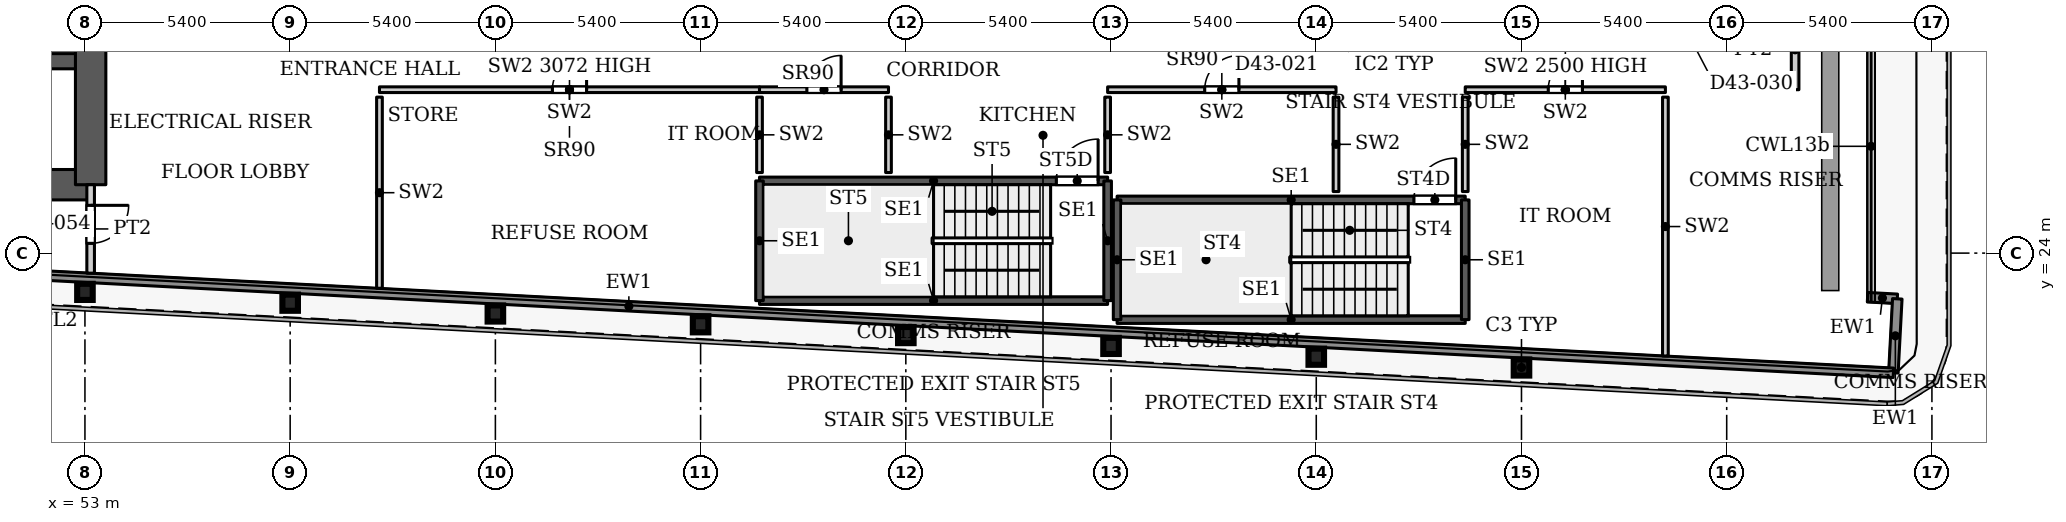
"""IFC4 building model, lengths in metres.
Left out: names, types, materials, properties, quantities, classifications, styles, units other than length and angle.
Written with IfcOpenShell. Run it as: python <this file> out.ifc"""

import sys

from ifc_helpers import new_model, si_unit, direction, frame, frame_2d, origin, origin_2d, place, context, subcontext, project, spatial, rectangle, i_section, extrude, source, transform, mapped, element, fill, save


model = new_model("IFC4")
c1 = context("Model", 3, precision=1e-05, world=origin(), true_north=direction((0.0, 1.0)))
c2 = subcontext(c1, "Body", "Model", "MODEL_VIEW")
j1 = project(units=[si_unit("LENGTHUNIT", "METRE"), si_unit("PLANEANGLEUNIT", "RADIAN")], contexts=[c1])
p1 = place(None, origin())
s1 = spatial("IfcSite", under=j1, at=p1, CompositionType="ELEMENT")
p2 = place(p1, origin())
s2 = spatial("IfcBuilding", under=s1, at=p2, CompositionType="ELEMENT")
p3 = place(p2, frame((0.0, 0.0, 183.8)))
s3 = spatial("IfcBuildingStorey", under=s2, at=p3, CompositionType="ELEMENT", Elevation=183.8)
for number, where, z_axis, x_axis in (
    (1, (90.8, 20.99, 0.0), (0.0, 0.0, 1.0), (1.0, 0.0, 0.0)),
    (2, (85.4, 21.274, 0.0), (0.0, 0.0, 1.0), (1.0, 0.0, 0.0)),
    (3, (80.0, 21.558, 0.0), (0.0, 0.0, 1.0), (1.0, 0.0, 0.0)),
    (4, (74.6, 21.843, 0.0), (0.0, 0.0, 1.0), (1.0, 0.0, 0.0)),
    (5, (69.2, 22.127, 0.0), (0.0, 0.0, 1.0), (1.0, 0.0, 0.0)),
    (6, (63.8, 22.411, 0.0), (0.0, 0.0, 1.0), (1.0, 0.0, 0.0)),
    (7, (58.4, 22.695, 0.0), (0.0, 0.0, 1.0), (1.0, 0.0, 0.0)),
    (8, (53.0, 22.98, 0.0), (0.0, 0.0, 1.0), (1.0, 0.0, 0.0)),
):
    element("IfcColumn", number, at=place(p3, frame(where, z_axis=z_axis, x_axis=x_axis)), inside=s3, PredefinedType="COLUMN", context=c2, shape_type="SweptSolid", body=[
        extrude(i_section(OverallWidth=0.409, OverallDepth=0.425, WebThickness=0.033, FlangeThickness=0.052, FilletRadius=0.013, at=origin_2d()), origin(), (0.0, 0.0, 1.0), 3.9),
    ])
p4 = place(p3, frame((34.75, 25.8, 0.0), z_axis=(0.0, 0.0, 1.0), x_axis=(1.0, 0.0, 0.0)))
e9 = element("IfcWall", 9, at=p4, inside=s3, PredefinedType="SHEAR", context=c2, shape_type="SweptSolid", body=[
    extrude(rectangle(XDim=18.4, YDim=0.8, at=frame_2d((9.2, 0.0))), origin(), (0.0, 0.0, 1.0), 3.9),
])
p5 = place(p3, frame((34.75, 29.05, 0.0), z_axis=(0.0, 0.0, 1.0), x_axis=(1.0, 0.0, 0.0)))
e10 = element("IfcWall", 10, at=p5, inside=s3, PredefinedType="SHEAR", context=c2, shape_type="SweptSolid", body=[
    extrude(rectangle(XDim=18.4, YDim=0.4, at=frame_2d((9.2, 0.0))), origin(), (0.0, 0.0, 1.0), 3.9),
])
p6 = place(p5, frame((0.875, 0.0, 0.0)))
e11 = element("IfcOpeningElement", 11, at=p6, cuts=e10, PredefinedType="OPENING", context=c2, shape_type="SweptSolid", body=[
    extrude(rectangle(XDim=1.1, YDim=2.2, at=frame_2d((0.55, 1.1))), frame((0.0, 0.21, 0.0), z_axis=(0.0, -1.0, 0.0), x_axis=(1.0, 0.0, 0.0)), (0.0, 0.0, 1.0), 0.42),
])
p7 = place(p5, frame((3.725, 0.0, 0.0)))
e12 = element("IfcOpeningElement", 12, at=p7, cuts=e10, PredefinedType="OPENING", context=c2, shape_type="SweptSolid", body=[
    extrude(rectangle(XDim=1.1, YDim=2.2, at=frame_2d((0.55, 1.1))), frame((0.0, 0.21, 0.0), z_axis=(0.0, -1.0, 0.0), x_axis=(1.0, 0.0, 0.0)), (0.0, 0.0, 1.0), 0.42),
])
p8 = place(p5, frame((6.575, 0.0, 0.0)))
e13 = element("IfcOpeningElement", 13, at=p8, cuts=e10, PredefinedType="OPENING", context=c2, shape_type="SweptSolid", body=[
    extrude(rectangle(XDim=1.1, YDim=2.2, at=frame_2d((0.55, 1.1))), frame((0.0, 0.21, 0.0), z_axis=(0.0, -1.0, 0.0), x_axis=(1.0, 0.0, 0.0)), (0.0, 0.0, 1.0), 0.42),
])
p9 = place(p5, frame((9.425, 0.0, 0.0)))
e14 = element("IfcOpeningElement", 14, at=p9, cuts=e10, PredefinedType="OPENING", context=c2, shape_type="SweptSolid", body=[
    extrude(rectangle(XDim=1.1, YDim=2.2, at=frame_2d((0.55, 1.1))), frame((0.0, 0.21, 0.0), z_axis=(0.0, -1.0, 0.0), x_axis=(1.0, 0.0, 0.0)), (0.0, 0.0, 1.0), 0.42),
])
p10 = place(p5, frame((12.275, 0.0, 0.0)))
e15 = element("IfcOpeningElement", 15, at=p10, cuts=e10, PredefinedType="OPENING", context=c2, shape_type="SweptSolid", body=[
    extrude(rectangle(XDim=1.1, YDim=2.2, at=frame_2d((0.55, 1.1))), frame((0.0, 0.21, 0.0), z_axis=(0.0, -1.0, 0.0), x_axis=(1.0, 0.0, 0.0)), (0.0, 0.0, 1.0), 0.42),
])
p11 = place(p5, frame((15.125, 0.0, 0.0)))
e16 = element("IfcOpeningElement", 16, at=p11, cuts=e10, PredefinedType="OPENING", context=c2, shape_type="SweptSolid", body=[
    extrude(rectangle(XDim=1.1, YDim=2.2, at=frame_2d((0.55, 1.1))), frame((0.0, 0.21, 0.0), z_axis=(0.0, -1.0, 0.0), x_axis=(1.0, 0.0, 0.0)), (0.0, 0.0, 1.0), 0.42),
])
p12 = place(p3, frame((53.15, 25.8, 0.0), z_axis=(0.0, 0.0, 1.0), x_axis=(0.0, 1.0, 0.0)))
e17 = element("IfcWall", 17, at=p12, inside=s3, PredefinedType="SHEAR", context=c2, shape_type="SweptSolid", body=[
    extrude(rectangle(XDim=10.4, YDim=0.8, at=frame_2d((5.2, 0.0))), origin(), (0.0, 0.0, 1.0), 3.9),
])
p13 = place(p3, frame((99.907, 22.839, 0.0), z_axis=(0.0, 0.0, 1.0), x_axis=(0.998561284263, -0.053622398031, 0.0)))
e18 = element("IfcWall", 18, at=p13, inside=s3, PredefinedType="SOLIDWALL", context=c2, shape_type="SweptSolid", body=[
    extrude(rectangle(XDim=0.783, YDim=0.25, at=frame_2d((0.392, 0.0))), origin(), (0.0, 0.0, 1.0), 3.75),
])
p14 = place(p3, frame((100.689, 22.797, 0.0), z_axis=(0.0, 0.0, 1.0), x_axis=(-0.052841433274, -0.998602915542, 0.0)))
e19 = element("IfcWall", 19, at=p14, inside=s3, PredefinedType="SOLIDWALL", context=c2, shape_type="SweptSolid", body=[
    extrude(rectangle(XDim=1.95, YDim=0.25, at=frame_2d((0.975, 0.0))), origin(), (0.0, 0.0, 1.0), 3.75),
])
p15 = place(p3, frame((100.586, 20.85, 0.0), z_axis=(0.0, 0.0, 1.0), x_axis=(-0.99861746497, 0.052565755559, 0.0)))
e20 = element("IfcWall", 20, at=p15, inside=s3, PredefinedType="SOLIDWALL", context=c2, shape_type="SweptSolid", body=[
    extrude(rectangle(XDim=66.639, YDim=0.25, at=frame_2d((33.319, 0.0))), origin(), (0.0, 0.0, 1.0), 3.75),
])
p16 = place(p3, frame((80.16, 22.25, 0.0), z_axis=(0.0, 0.0, 1.0), x_axis=(1.0, 0.0, 0.0)))
e21 = element("IfcWall", 21, at=p16, inside=s3, PredefinedType="SHEAR", context=c2, shape_type="SweptSolid", body=[
    extrude(rectangle(XDim=9.16, YDim=0.2, at=frame_2d((4.58, 0.0))), origin(), (0.0, 0.0, 1.0), 3.9),
])
p17 = place(p3, frame((80.16, 25.4, 0.0), z_axis=(0.0, 0.0, 1.0), x_axis=(1.0, 0.0, 0.0)))
e22 = element("IfcWall", 22, at=p17, inside=s3, PredefinedType="SHEAR", context=c2, shape_type="SweptSolid", body=[
    extrude(rectangle(XDim=9.16, YDim=0.2, at=frame_2d((4.58, 0.0))), origin(), (0.0, 0.0, 1.0), 3.9),
])
p18 = place(p17, frame((7.81, 0.0, 0.0)))
e23 = element("IfcOpeningElement", 23, at=p18, cuts=e22, PredefinedType="OPENING", context=c2, shape_type="SweptSolid", body=[
    extrude(rectangle(XDim=1.1, YDim=2.2, at=frame_2d((0.55, 1.1))), frame((0.0, 0.11, 0.0), z_axis=(0.0, -1.0, 0.0), x_axis=(1.0, 0.0, 0.0)), (0.0, 0.0, 1.0), 0.22),
])
for number, where, z_axis, x_axis in (
    (24, (80.16, 22.25, 0.0), (0.0, 0.0, 1.0), (0.0, 1.0, 0.0)),
    (25, (89.32, 22.25, 0.0), (0.0, 0.0, 1.0), (0.0, 1.0, 0.0)),
):
    element("IfcWall", number, at=place(p3, frame(where, z_axis=z_axis, x_axis=x_axis)), inside=s3, PredefinedType="SHEAR", context=c2, shape_type="SweptSolid", body=[
        extrude(rectangle(XDim=3.15, YDim=0.2, at=frame_2d((1.575, 0.0))), origin(), (0.0, 0.0, 1.0), 3.9),
    ])
p19 = place(p3, frame((70.75, 22.75, 0.0), z_axis=(0.0, 0.0, 1.0), x_axis=(1.0, 0.0, 0.0)))
e26 = element("IfcWall", 26, at=p19, inside=s3, PredefinedType="SHEAR", context=c2, shape_type="SweptSolid", body=[
    extrude(rectangle(XDim=9.16, YDim=0.2, at=frame_2d((4.58, 0.0))), origin(), (0.0, 0.0, 1.0), 3.9),
])
p20 = place(p3, frame((70.75, 25.9, 0.0), z_axis=(0.0, 0.0, 1.0), x_axis=(1.0, 0.0, 0.0)))
e27 = element("IfcWall", 27, at=p20, inside=s3, PredefinedType="SHEAR", context=c2, shape_type="SweptSolid", body=[
    extrude(rectangle(XDim=9.16, YDim=0.2, at=frame_2d((4.58, 0.0))), origin(), (0.0, 0.0, 1.0), 3.9),
])
p21 = place(p20, frame((7.81, 0.0, 0.0)))
e28 = element("IfcOpeningElement", 28, at=p21, cuts=e27, PredefinedType="OPENING", context=c2, shape_type="SweptSolid", body=[
    extrude(rectangle(XDim=1.1, YDim=2.2, at=frame_2d((0.55, 1.1))), frame((0.0, 0.11, 0.0), z_axis=(0.0, -1.0, 0.0), x_axis=(1.0, 0.0, 0.0)), (0.0, 0.0, 1.0), 0.22),
])
for number, where, z_axis, x_axis in (
    (29, (70.75, 22.75, 0.0), (0.0, 0.0, 1.0), (0.0, 1.0, 0.0)),
    (30, (79.91, 22.75, 0.0), (0.0, 0.0, 1.0), (0.0, 1.0, 0.0)),
):
    element("IfcWall", number, at=place(p3, frame(where, z_axis=z_axis, x_axis=x_axis)), inside=s3, PredefinedType="SHEAR", context=c2, shape_type="SweptSolid", body=[
        extrude(rectangle(XDim=3.15, YDim=0.2, at=frame_2d((1.575, 0.0))), origin(), (0.0, 0.0, 1.0), 3.9),
    ])
p22 = place(p3, frame((60.75, 28.3, 0.0), z_axis=(0.0, 0.0, 1.0), x_axis=(1.0, 0.0, 0.0)))
e31 = element("IfcWall", 31, at=p22, inside=s3, PredefinedType="PARTITIONING", context=c2, shape_type="SweptSolid", body=[
    extrude(rectangle(XDim=10.0, YDim=0.15, at=frame_2d((5.0, 0.0))), origin(), (0.0, 0.0, 1.0), 3.072),
])
p23 = place(p22, frame((4.55, 0.0, 0.0)))
e32 = element("IfcOpeningElement", 32, at=p23, cuts=e31, PredefinedType="OPENING", context=c2, shape_type="SweptSolid", body=[
    extrude(rectangle(XDim=0.9, YDim=2.2, at=frame_2d((0.45, 1.1))), frame((0.0, 0.085, 0.0), z_axis=(0.0, -1.0, 0.0), x_axis=(1.0, 0.0, 0.0)), (0.0, 0.0, 1.0), 0.17),
])
p24 = place(p3, frame((60.75, 23.075, 0.0), z_axis=(0.0, 0.0, 1.0), x_axis=(0.0, 1.0, 0.0)))
e33 = element("IfcWall", 33, at=p24, inside=s3, PredefinedType="PARTITIONING", context=c2, shape_type="SweptSolid", body=[
    extrude(rectangle(XDim=5.03, YDim=0.15, at=frame_2d((2.515, 0.0))), origin(), (0.0, 0.0, 1.0), 3.9),
])
p25 = place(p3, frame((70.75, 26.12, 0.0), z_axis=(0.0, 0.0, 1.0), x_axis=(0.0, 1.0, 0.0)))
e34 = element("IfcWall", 34, at=p25, inside=s3, PredefinedType="PARTITIONING", context=c2, shape_type="SweptSolid", body=[
    extrude(rectangle(XDim=1.985, YDim=0.15, at=frame_2d((0.992, 0.0))), origin(), (0.0, 0.0, 1.0), 3.9),
])
p26 = place(p3, frame((70.75, 28.3, 0.0), z_axis=(0.0, 0.0, 1.0), x_axis=(1.0, 0.0, 0.0)))
e35 = element("IfcWall", 35, at=p26, inside=s3, PredefinedType="PARTITIONING", context=c2, shape_type="SweptSolid", body=[
    extrude(rectangle(XDim=3.394, YDim=0.15, at=frame_2d((1.697, 0.0))), origin(), (0.0, 0.0, 1.0), 3.9),
])
p27 = place(p26, frame((1.247, 0.0, 0.0)))
e36 = element("IfcOpeningElement", 36, at=p27, cuts=e35, PredefinedType="OPENING", context=c2, shape_type="SweptSolid", body=[
    extrude(rectangle(XDim=0.9, YDim=2.2, at=frame_2d((0.45, 1.1))), frame((0.0, 0.085, 0.0), z_axis=(0.0, -1.0, 0.0), x_axis=(1.0, 0.0, 0.0)), (0.0, 0.0, 1.0), 0.17),
])
p28 = place(p3, frame((74.144, 26.12, 0.0), z_axis=(0.0, 0.0, 1.0), x_axis=(0.0, 1.0, 0.0)))
e37 = element("IfcWall", 37, at=p28, inside=s3, PredefinedType="PARTITIONING", context=c2, shape_type="SweptSolid", body=[
    extrude(rectangle(XDim=1.985, YDim=0.15, at=frame_2d((0.992, 0.0))), origin(), (0.0, 0.0, 1.0), 3.9),
])
p29 = place(p3, frame((79.91, 28.3, 0.0), z_axis=(0.0, 0.0, 1.0), x_axis=(1.0, 0.0, 0.0)))
e38 = element("IfcWall", 38, at=p29, inside=s3, PredefinedType="PARTITIONING", context=c2, shape_type="SweptSolid", body=[
    extrude(rectangle(XDim=6.01, YDim=0.15, at=frame_2d((3.005, 0.0))), origin(), (0.0, 0.0, 1.0), 3.9),
])
p30 = place(p29, frame((2.555, 0.0, 0.0)))
e39 = element("IfcOpeningElement", 39, at=p30, cuts=e38, PredefinedType="OPENING", context=c2, shape_type="SweptSolid", body=[
    extrude(rectangle(XDim=0.9, YDim=2.2, at=frame_2d((0.45, 1.1))), frame((0.0, 0.085, 0.0), z_axis=(0.0, -1.0, 0.0), x_axis=(1.0, 0.0, 0.0)), (0.0, 0.0, 1.0), 0.17),
])
p31 = place(p3, frame((79.91, 26.12, 0.0), z_axis=(0.0, 0.0, 1.0), x_axis=(0.0, 1.0, 0.0)))
e40 = element("IfcWall", 40, at=p31, inside=s3, PredefinedType="PARTITIONING", context=c2, shape_type="SweptSolid", body=[
    extrude(rectangle(XDim=1.985, YDim=0.15, at=frame_2d((0.992, 0.0))), origin(), (0.0, 0.0, 1.0), 3.9),
])
p32 = place(p3, frame((85.92, 25.62, 0.0), z_axis=(0.0, 0.0, 1.0), x_axis=(0.0, 1.0, 0.0)))
e41 = element("IfcWall", 41, at=p32, inside=s3, PredefinedType="PARTITIONING", context=c2, shape_type="SweptSolid", body=[
    extrude(rectangle(XDim=2.485, YDim=0.15, at=frame_2d((1.242, 0.0))), origin(), (0.0, 0.0, 1.0), 3.9),
])
p33 = place(p3, frame((89.32, 28.3, 0.0), z_axis=(0.0, 0.0, 1.0), x_axis=(1.0, 0.0, 0.0)))
e42 = element("IfcWall", 42, at=p33, inside=s3, PredefinedType="PARTITIONING", context=c2, shape_type="SweptSolid", body=[
    extrude(rectangle(XDim=5.267, YDim=0.15, at=frame_2d((2.633, 0.0))), origin(), (0.0, 0.0, 1.0), 2.5),
])
p34 = place(p33, frame((2.184, 0.0, 0.0)))
e43 = element("IfcOpeningElement", 43, at=p34, cuts=e42, PredefinedType="OPENING", context=c2, shape_type="SweptSolid", body=[
    extrude(rectangle(XDim=0.9, YDim=2.2, at=frame_2d((0.45, 1.1))), frame((0.0, 0.085, 0.0), z_axis=(0.0, -1.0, 0.0), x_axis=(1.0, 0.0, 0.0)), (0.0, 0.0, 1.0), 0.17),
])
p35 = place(p3, frame((89.32, 25.62, 0.0), z_axis=(0.0, 0.0, 1.0), x_axis=(0.0, 1.0, 0.0)))
e44 = element("IfcWall", 44, at=p35, inside=s3, PredefinedType="PARTITIONING", context=c2, shape_type="SweptSolid", body=[
    extrude(rectangle(XDim=2.485, YDim=0.15, at=frame_2d((1.242, 0.0))), origin(), (0.0, 0.0, 1.0), 3.9),
])
p36 = place(p3, frame((94.587, 21.293, 0.0), z_axis=(0.0, 0.0, 1.0), x_axis=(0.0, 1.0, 0.0)))
e45 = element("IfcWall", 45, at=p36, inside=s3, PredefinedType="PARTITIONING", context=c2, shape_type="SweptSolid", body=[
    extrude(rectangle(XDim=6.812, YDim=0.15, at=frame_2d((3.406, 0.0))), origin(), (0.0, 0.0, 1.0), 3.9),
])
p37 = place(p3, frame((53.15, 23.472, 0.0), z_axis=(0.0, 0.0, 1.0), x_axis=(0.0, 1.0, 0.0)))
e46 = element("IfcWall", 46, at=p37, inside=s3, PredefinedType="PARTITIONING", context=c2, shape_type="SweptSolid", body=[
    extrude(rectangle(XDim=2.328, YDim=0.2, at=frame_2d((1.164, 0.0))), origin(), (0.0, 0.0, 1.0), 3.6),
])
p38 = place(p37, frame((0.785, 0.0, 0.0)))
e47 = element("IfcOpeningElement", 47, at=p38, cuts=e46, PredefinedType="OPENING", context=c2, shape_type="SweptSolid", body=[
    extrude(rectangle(XDim=1.0, YDim=2.1, at=frame_2d((0.5, 1.05))), frame((0.0, 0.11, 0.0), z_axis=(0.0, -1.0, 0.0), x_axis=(1.0, 0.0, 0.0)), (0.0, 0.0, 1.0), 0.22),
])
p39 = place(p3, frame((98.0, 28.3, 0.0), z_axis=(0.0, 0.0, 1.0), x_axis=(0.0, 1.0, 0.0)))
e48 = element("IfcWall", 48, at=p39, inside=s3, PredefinedType="PARTITIONING", context=c2, shape_type="SweptSolid", body=[
    extrude(rectangle(XDim=2.1, YDim=0.2, at=frame_2d((1.05, 0.0))), origin(), (0.0, 0.0, 1.0), 3.6),
])
m1 = source(origin(), c2, "Body", "SweptSolid", [
    extrude(rectangle(XDim=0.9, YDim=2.2, at=frame_2d((0.45, 1.1))), frame((0.0, 0.025, 0.0), z_axis=(0.0, -1.0, 0.0), x_axis=(1.0, 0.0, 0.0)), (0.0, 0.0, 1.0), 0.05),
])
p40 = place(p23, origin())
e49 = element("IfcDoor", 49, at=p40, inside=s3, OperationType="SINGLE_SWING_LEFT", PredefinedType="DOOR", context=c2, shape_type="MappedRepresentation", body=[
    mapped(m1, transform((0.0, 0.0, 0.0), x_axis=(1.0, 0.0, 0.0), y_axis=(0.0, 1.0, 0.0), z_axis=(0.0, 0.0, 1.0), scale=1.0)),
])
fill(e32, e49)
p41 = place(p27, origin())
e50 = element("IfcDoor", 50, at=p41, inside=s3, OperationType="SINGLE_SWING_LEFT", PredefinedType="DOOR", context=c2, shape_type="MappedRepresentation", body=[
    mapped(m1, transform((0.0, 0.0, 0.0), x_axis=(1.0, 0.0, 0.0), y_axis=(0.0, 1.0, 0.0), z_axis=(0.0, 0.0, 1.0), scale=1.0)),
])
fill(e36, e50)
p42 = place(p30, origin())
e51 = element("IfcDoor", 51, at=p42, inside=s3, OperationType="SINGLE_SWING_LEFT", PredefinedType="DOOR", context=c2, shape_type="MappedRepresentation", body=[
    mapped(m1, transform((0.0, 0.0, 0.0), x_axis=(1.0, 0.0, 0.0), y_axis=(0.0, 1.0, 0.0), z_axis=(0.0, 0.0, 1.0), scale=1.0)),
])
fill(e39, e51)
p43 = place(p34, origin())
e52 = element("IfcDoor", 52, at=p43, inside=s3, OperationType="SINGLE_SWING_LEFT", PredefinedType="DOOR", context=c2, shape_type="MappedRepresentation", body=[
    mapped(m1, transform((0.0, 0.0, 0.0), x_axis=(1.0, 0.0, 0.0), y_axis=(0.0, 1.0, 0.0), z_axis=(0.0, 0.0, 1.0), scale=1.0)),
])
fill(e43, e52)
m2 = source(origin(), c2, "Body", "SweptSolid", [
    extrude(rectangle(XDim=1.1, YDim=2.2, at=frame_2d((0.55, 1.1))), frame((0.0, 0.025, 0.0), z_axis=(0.0, -1.0, 0.0), x_axis=(1.0, 0.0, 0.0)), (0.0, 0.0, 1.0), 0.05),
])
p44 = place(p18, origin())
e53 = element("IfcDoor", 53, at=p44, inside=s3, OperationType="SINGLE_SWING_LEFT", PredefinedType="DOOR", context=c2, shape_type="MappedRepresentation", body=[
    mapped(m2, transform((0.0, 0.0, 0.0), x_axis=(1.0, 0.0, 0.0), y_axis=(0.0, 1.0, 0.0), z_axis=(0.0, 0.0, 1.0), scale=1.0)),
])
fill(e23, e53)
p45 = place(p21, origin())
e54 = element("IfcDoor", 54, at=p45, inside=s3, OperationType="SINGLE_SWING_LEFT", PredefinedType="DOOR", context=c2, shape_type="MappedRepresentation", body=[
    mapped(m2, transform((0.0, 0.0, 0.0), x_axis=(1.0, 0.0, 0.0), y_axis=(0.0, 1.0, 0.0), z_axis=(0.0, 0.0, 1.0), scale=1.0)),
])
fill(e28, e54)
m3 = source(origin(), c2, "Body", "SweptSolid", [
    extrude(rectangle(XDim=1.0, YDim=2.1, at=frame_2d((0.5, 1.05))), frame((0.0, 0.025, 0.0), z_axis=(0.0, -1.0, 0.0), x_axis=(1.0, 0.0, 0.0)), (0.0, 0.0, 1.0), 0.05),
])
p46 = place(p38, origin())
e55 = element("IfcDoor", 55, at=p46, inside=s3, OperationType="SINGLE_SWING_RIGHT", PredefinedType="DOOR", context=c2, shape_type="MappedRepresentation", body=[
    mapped(m3, transform((0.0, 0.0, 0.0), x_axis=(1.0, 0.0, 0.0), y_axis=(0.0, 1.0, 0.0), z_axis=(0.0, 0.0, 1.0), scale=1.0)),
])
fill(e47, e55)
save(model, sys.argv[1])
